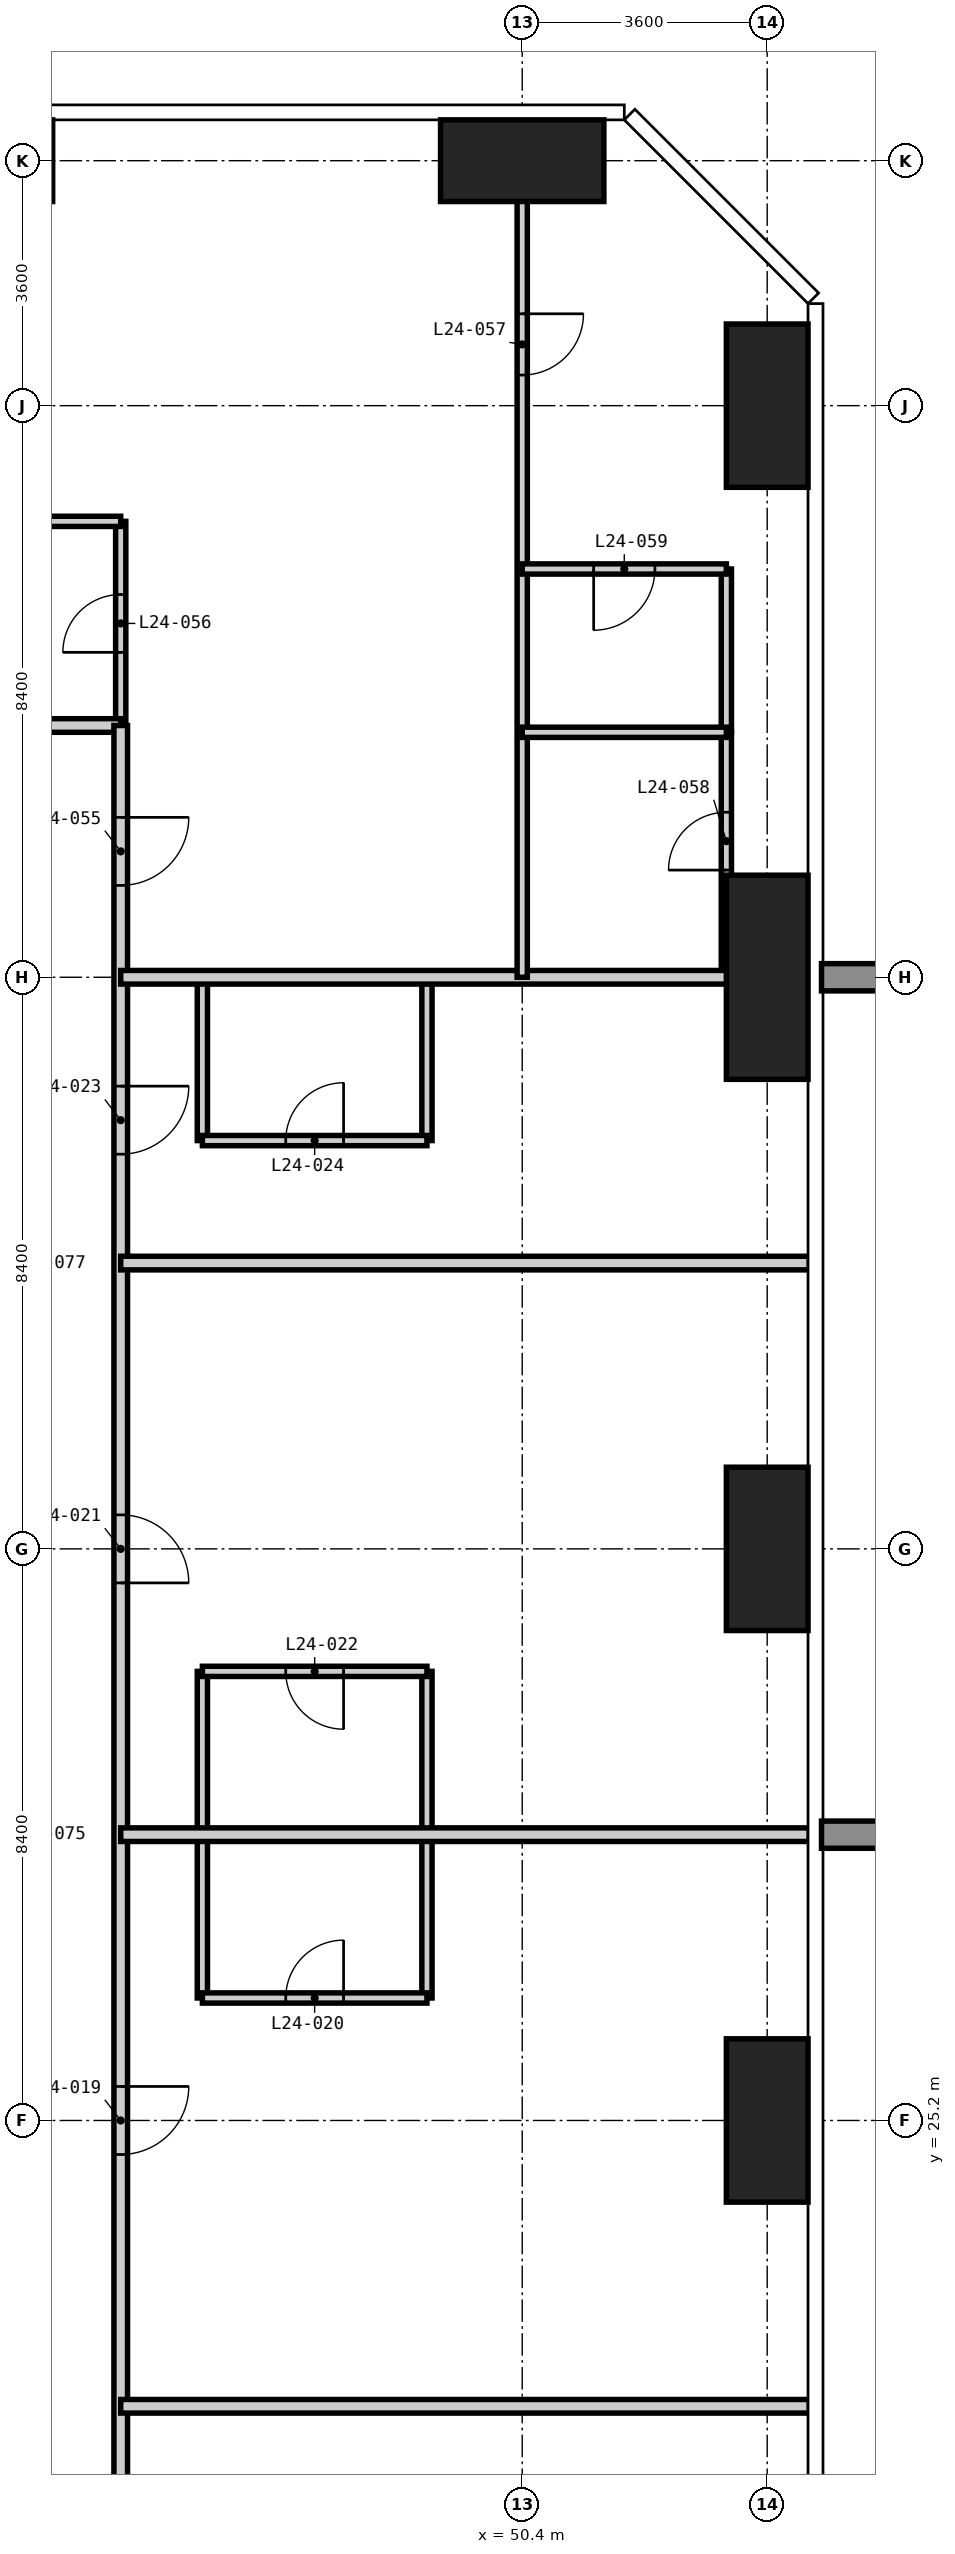
"""IFC4 building model, lengths in metres.
Left out: names, types, materials, properties, quantities, classifications, styles, units other than length and angle.
Written with IfcOpenShell. Run it as: python <this file> out.ifc"""

import sys

from ifc_helpers import new_model, si_unit, direction, frame, frame_2d, origin, origin_2d, place, context, subcontext, project, spatial, rectangle, extrude, element, fill, save


model = new_model("IFC4")
c1 = context("Model", 3, precision=1e-05, world=origin(), true_north=direction((0.0, 1.0)))
c2 = subcontext(c1, "Body", "Model", "MODEL_VIEW")
j1 = project(units=[si_unit("LENGTHUNIT", "METRE"), si_unit("PLANEANGLEUNIT", "RADIAN")], contexts=[c1])
p1 = place(None, origin())
s1 = spatial("IfcSite", under=j1, at=p1, CompositionType="ELEMENT")
p2 = place(p1, origin())
s2 = spatial("IfcBuilding", under=s1, at=p2, CompositionType="ELEMENT")
p3 = place(p2, frame((0.0, 0.0, 97.2)))
s3 = spatial("IfcBuildingStorey", under=s2, at=p3, CompositionType="ELEMENT", Elevation=97.2)
p4 = place(p3, frame((50.4, 54.0, -0.35), z_axis=(0.0, 0.0, 1.0), x_axis=(1.0, 0.0, 0.0)))
e1 = element("IfcColumn", 1, at=p4, inside=s3, PredefinedType="COLUMN", context=c2, shape_type="SweptSolid", body=[
    extrude(rectangle(XDim=2.4, YDim=1.2, at=origin_2d()), origin(), (0.0, 0.0, 1.0), 3.6),
])
for number, where, z_axis, x_axis in (
    (2, (54.0, 25.2, -0.35), (0.0, 0.0, 1.0), (1.0, 0.0, 0.0)),
    (3, (54.0, 33.6, -0.35), (0.0, 0.0, 1.0), (1.0, 0.0, 0.0)),
):
    element("IfcColumn", number, at=place(p3, frame(where, z_axis=z_axis, x_axis=x_axis)), inside=s3, PredefinedType="COLUMN", context=c2, shape_type="SweptSolid", body=[
        extrude(rectangle(XDim=1.2, YDim=2.4, at=origin_2d()), origin(), (0.0, 0.0, 1.0), 3.6),
    ])
p5 = place(p3, frame((54.0, 42.0, -0.35), z_axis=(0.0, 0.0, 1.0), x_axis=(1.0, 0.0, 0.0)))
e4 = element("IfcColumn", 4, at=p5, inside=s3, PredefinedType="COLUMN", context=c2, shape_type="SweptSolid", body=[
    extrude(rectangle(XDim=1.2, YDim=3.0, at=origin_2d()), origin(), (0.0, 0.0, 1.0), 3.6),
])
p6 = place(p3, frame((54.0, 50.4, -0.35), z_axis=(0.0, 0.0, 1.0), x_axis=(1.0, 0.0, 0.0)))
e5 = element("IfcColumn", 5, at=p6, inside=s3, PredefinedType="COLUMN", context=c2, shape_type="SweptSolid", body=[
    extrude(rectangle(XDim=1.2, YDim=2.4, at=origin_2d()), origin(), (0.0, 0.0, 1.0), 3.6),
])
p7 = place(p3, frame((44.5, 45.7, 0.0), z_axis=(0.0, 0.0, 1.0), x_axis=(0.0, 1.0, 0.0)))
e6 = element("IfcWall", 6, at=p7, inside=s3, PredefinedType="PARTITIONING", context=c2, shape_type="SweptSolid", body=[
    extrude(rectangle(XDim=3.0, YDim=0.15, at=frame_2d((1.5, 0.0))), origin(), (0.0, 0.0, 1.0), 3.25),
])
p8 = place(p7, frame((1.075, 0.0, 0.0)))
e7 = element("IfcOpeningElement", 7, at=p8, cuts=e6, PredefinedType="OPENING", context=c2, shape_type="SweptSolid", body=[
    extrude(rectangle(XDim=0.85, YDim=2.1, at=frame_2d((0.425, 1.05))), frame((0.0, 0.085, 0.0), z_axis=(0.0, -1.0, 0.0), x_axis=(1.0, 0.0, 0.0)), (0.0, 0.0, 1.0), 0.17),
])
p9 = place(p3, frame((45.7, 27.0, 0.0), z_axis=(0.0, 0.0, 1.0), x_axis=(0.0, 1.0, 0.0)))
e8 = element("IfcWall", 8, at=p9, inside=s3, PredefinedType="PARTITIONING", context=c2, shape_type="SweptSolid", body=[
    extrude(rectangle(XDim=4.8, YDim=0.15, at=frame_2d((2.4, 0.0))), origin(), (0.0, 0.0, 1.0), 3.25),
])
p10 = place(p3, frame((45.7, 39.6, 0.0), z_axis=(0.0, 0.0, 1.0), x_axis=(0.0, 1.0, 0.0)))
e9 = element("IfcWall", 9, at=p10, inside=s3, PredefinedType="PARTITIONING", context=c2, shape_type="SweptSolid", body=[
    extrude(rectangle(XDim=2.4, YDim=0.15, at=frame_2d((1.2, 0.0))), origin(), (0.0, 0.0, 1.0), 3.25),
])
p11 = place(p3, frame((49.0, 27.0, 0.0), z_axis=(0.0, 0.0, 1.0), x_axis=(0.0, 1.0, 0.0)))
e10 = element("IfcWall", 10, at=p11, inside=s3, PredefinedType="PARTITIONING", context=c2, shape_type="SweptSolid", body=[
    extrude(rectangle(XDim=4.8, YDim=0.15, at=frame_2d((2.4, 0.0))), origin(), (0.0, 0.0, 1.0), 3.25),
])
p12 = place(p3, frame((49.0, 39.6, 0.0), z_axis=(0.0, 0.0, 1.0), x_axis=(0.0, 1.0, 0.0)))
e11 = element("IfcWall", 11, at=p12, inside=s3, PredefinedType="PARTITIONING", context=c2, shape_type="SweptSolid", body=[
    extrude(rectangle(XDim=2.4, YDim=0.15, at=frame_2d((1.2, 0.0))), origin(), (0.0, 0.0, 1.0), 3.25),
])
p13 = place(p3, frame((53.4, 42.0, 0.0), z_axis=(0.0, 0.0, 1.0), x_axis=(0.0, 1.0, 0.0)))
e12 = element("IfcWall", 12, at=p13, inside=s3, PredefinedType="PARTITIONING", context=c2, shape_type="SweptSolid", body=[
    extrude(rectangle(XDim=3.6, YDim=0.15, at=frame_2d((1.8, 0.0))), origin(), (0.0, 0.0, 1.0), 3.25),
])
p14 = place(p13, frame((1.575, 0.0, 0.0)))
e13 = element("IfcOpeningElement", 13, at=p14, cuts=e12, PredefinedType="OPENING", context=c2, shape_type="SweptSolid", body=[
    extrude(rectangle(XDim=0.85, YDim=2.1, at=frame_2d((0.425, 1.05))), frame((0.0, 0.085, 0.0), z_axis=(0.0, -1.0, 0.0), x_axis=(1.0, 0.0, 0.0)), (0.0, 0.0, 1.0), 0.17),
])
p15 = place(p3, frame((45.7, 27.0, 0.0), z_axis=(0.0, 0.0, 1.0), x_axis=(1.0, 0.0, 0.0)))
e14 = element("IfcWall", 14, at=p15, inside=s3, PredefinedType="PARTITIONING", context=c2, shape_type="SweptSolid", body=[
    extrude(rectangle(XDim=3.3, YDim=0.15, at=frame_2d((1.65, 0.0))), origin(), (0.0, 0.0, 1.0), 3.25),
])
p16 = place(p15, frame((1.225, 0.0, 0.0)))
e15 = element("IfcOpeningElement", 15, at=p16, cuts=e14, PredefinedType="OPENING", context=c2, shape_type="SweptSolid", body=[
    extrude(rectangle(XDim=0.85, YDim=2.1, at=frame_2d((0.425, 1.05))), frame((0.0, 0.085, 0.0), z_axis=(0.0, -1.0, 0.0), x_axis=(1.0, 0.0, 0.0)), (0.0, 0.0, 1.0), 0.17),
])
p17 = place(p3, frame((45.7, 31.8, 0.0), z_axis=(0.0, 0.0, 1.0), x_axis=(1.0, 0.0, 0.0)))
e16 = element("IfcWall", 16, at=p17, inside=s3, PredefinedType="PARTITIONING", context=c2, shape_type="SweptSolid", body=[
    extrude(rectangle(XDim=3.3, YDim=0.15, at=frame_2d((1.65, 0.0))), origin(), (0.0, 0.0, 1.0), 3.25),
])
p18 = place(p17, frame((1.225, 0.0, 0.0)))
e17 = element("IfcOpeningElement", 17, at=p18, cuts=e16, PredefinedType="OPENING", context=c2, shape_type="SweptSolid", body=[
    extrude(rectangle(XDim=0.85, YDim=2.1, at=frame_2d((0.425, 1.05))), frame((0.0, 0.085, 0.0), z_axis=(0.0, -1.0, 0.0), x_axis=(1.0, 0.0, 0.0)), (0.0, 0.0, 1.0), 0.17),
])
p19 = place(p3, frame((45.7, 39.6, 0.0), z_axis=(0.0, 0.0, 1.0), x_axis=(1.0, 0.0, 0.0)))
e18 = element("IfcWall", 18, at=p19, inside=s3, PredefinedType="PARTITIONING", context=c2, shape_type="SweptSolid", body=[
    extrude(rectangle(XDim=3.3, YDim=0.15, at=frame_2d((1.65, 0.0))), origin(), (0.0, 0.0, 1.0), 3.25),
])
p20 = place(p19, frame((1.225, 0.0, 0.0)))
e19 = element("IfcOpeningElement", 19, at=p20, cuts=e18, PredefinedType="OPENING", context=c2, shape_type="SweptSolid", body=[
    extrude(rectangle(XDim=0.85, YDim=2.1, at=frame_2d((0.425, 1.05))), frame((0.0, 0.085, 0.0), z_axis=(0.0, -1.0, 0.0), x_axis=(1.0, 0.0, 0.0)), (0.0, 0.0, 1.0), 0.17),
])
p21 = place(p3, frame((42.0, 48.7, 0.0), z_axis=(0.0, 0.0, 1.0), x_axis=(1.0, 0.0, 0.0)))
e20 = element("IfcWall", 20, at=p21, inside=s3, PredefinedType="PARTITIONING", context=c2, shape_type="SweptSolid", body=[
    extrude(rectangle(XDim=2.5, YDim=0.15, at=frame_2d((1.25, 0.0))), origin(), (0.0, 0.0, 1.0), 3.25),
])
p22 = place(p3, frame((12.6, 45.7, 0.0), z_axis=(0.0, 0.0, 1.0), x_axis=(1.0, 0.0, 0.0)))
e21 = element("IfcWall", 21, at=p22, inside=s3, PredefinedType="PARTITIONING", context=c2, shape_type="SweptSolid", body=[
    extrude(rectangle(XDim=31.9, YDim=0.2, at=frame_2d((15.95, 0.0))), origin(), (0.0, 0.0, 1.0), 3.25),
])
p23 = place(p22, frame((5.8, 0.0, 0.0)))
e22 = element("IfcOpeningElement", 22, at=p23, cuts=e21, PredefinedType="OPENING", context=c2, shape_type="SweptSolid", body=[
    extrude(rectangle(XDim=1.0, YDim=2.2, at=frame_2d((0.5, 1.1))), frame((0.0, 0.11, 0.0), z_axis=(0.0, -1.0, 0.0), x_axis=(1.0, 0.0, 0.0)), (0.0, 0.0, 1.0), 0.22),
])
p24 = place(p22, frame((12.1, 0.0, 0.0)))
e23 = element("IfcOpeningElement", 23, at=p24, cuts=e21, PredefinedType="OPENING", context=c2, shape_type="SweptSolid", body=[
    extrude(rectangle(XDim=1.0, YDim=2.2, at=frame_2d((0.5, 1.1))), frame((0.0, 0.11, 0.0), z_axis=(0.0, -1.0, 0.0), x_axis=(1.0, 0.0, 0.0)), (0.0, 0.0, 1.0), 0.22),
])
p25 = place(p22, frame((20.5, 0.0, 0.0)))
e24 = element("IfcOpeningElement", 24, at=p25, cuts=e21, PredefinedType="OPENING", context=c2, shape_type="SweptSolid", body=[
    extrude(rectangle(XDim=1.0, YDim=2.2, at=frame_2d((0.5, 1.1))), frame((0.0, 0.11, 0.0), z_axis=(0.0, -1.0, 0.0), x_axis=(1.0, 0.0, 0.0)), (0.0, 0.0, 1.0), 0.22),
])
p26 = place(p22, frame((26.8, 0.0, 0.0)))
e25 = element("IfcOpeningElement", 25, at=p26, cuts=e21, PredefinedType="OPENING", context=c2, shape_type="SweptSolid", body=[
    extrude(rectangle(XDim=1.0, YDim=2.2, at=frame_2d((0.5, 1.1))), frame((0.0, 0.11, 0.0), z_axis=(0.0, -1.0, 0.0), x_axis=(1.0, 0.0, 0.0)), (0.0, 0.0, 1.0), 0.22),
])
p27 = place(p3, frame((44.5, 45.7, 0.0), z_axis=(0.0, 0.0, 1.0), x_axis=(0.0, -1.0, 0.0)))
e26 = element("IfcWall", 26, at=p27, inside=s3, PredefinedType="PARTITIONING", context=c2, shape_type="SweptSolid", body=[
    extrude(rectangle(XDim=32.0, YDim=0.2, at=frame_2d((16.0, 0.0))), origin(), (0.0, 0.0, 1.0), 3.25),
])
p28 = place(p27, frame((26.3, 0.0, 0.0)))
e27 = element("IfcOpeningElement", 27, at=p28, cuts=e26, PredefinedType="OPENING", context=c2, shape_type="SweptSolid", body=[
    extrude(rectangle(XDim=1.0, YDim=2.2, at=frame_2d((0.5, 1.1))), frame((0.0, 0.11, 0.0), z_axis=(0.0, -1.0, 0.0), x_axis=(1.0, 0.0, 0.0)), (0.0, 0.0, 1.0), 0.22),
])
p29 = place(p27, frame((20.0, 0.0, 0.0)))
e28 = element("IfcOpeningElement", 28, at=p29, cuts=e26, PredefinedType="OPENING", context=c2, shape_type="SweptSolid", body=[
    extrude(rectangle(XDim=1.0, YDim=2.2, at=frame_2d((0.5, 1.1))), frame((0.0, 0.11, 0.0), z_axis=(0.0, -1.0, 0.0), x_axis=(1.0, 0.0, 0.0)), (0.0, 0.0, 1.0), 0.22),
])
p30 = place(p27, frame((11.6, 0.0, 0.0)))
e29 = element("IfcOpeningElement", 29, at=p30, cuts=e26, PredefinedType="OPENING", context=c2, shape_type="SweptSolid", body=[
    extrude(rectangle(XDim=1.0, YDim=2.2, at=frame_2d((0.5, 1.1))), frame((0.0, 0.11, 0.0), z_axis=(0.0, -1.0, 0.0), x_axis=(1.0, 0.0, 0.0)), (0.0, 0.0, 1.0), 0.22),
])
p31 = place(p27, frame((5.3, 0.0, 0.0)))
e30 = element("IfcOpeningElement", 30, at=p31, cuts=e26, PredefinedType="OPENING", context=c2, shape_type="SweptSolid", body=[
    extrude(rectangle(XDim=1.0, YDim=2.2, at=frame_2d((0.5, 1.1))), frame((0.0, 0.11, 0.0), z_axis=(0.0, -1.0, 0.0), x_axis=(1.0, 0.0, 0.0)), (0.0, 0.0, 1.0), 0.22),
])
p32 = place(p27, frame((29.95, 0.0, 0.0)))
e31 = element("IfcOpeningElement", 31, at=p32, cuts=e26, PredefinedType="OPENING", context=c2, shape_type="SweptSolid", body=[
    extrude(rectangle(XDim=1.0, YDim=2.2, at=frame_2d((0.5, 1.1))), frame((0.0, 0.11, 0.0), z_axis=(0.0, -1.0, 0.0), x_axis=(1.0, 0.0, 0.0)), (0.0, 0.0, 1.0), 0.22),
])
p33 = place(p27, frame((1.35, 0.0, 0.0)))
e32 = element("IfcOpeningElement", 32, at=p33, cuts=e26, PredefinedType="OPENING", context=c2, shape_type="SweptSolid", body=[
    extrude(rectangle(XDim=1.0, YDim=2.2, at=frame_2d((0.5, 1.1))), frame((0.0, 0.11, 0.0), z_axis=(0.0, -1.0, 0.0), x_axis=(1.0, 0.0, 0.0)), (0.0, 0.0, 1.0), 0.22),
])
for number, where, z_axis, x_axis in (
    (33, (44.5, 21.0, 0.0), (0.0, 0.0, 1.0), (1.0, 0.0, 0.0)),
    (34, (44.5, 29.4, 0.0), (0.0, 0.0, 1.0), (1.0, 0.0, 0.0)),
    (35, (44.5, 37.8, 0.0), (0.0, 0.0, 1.0), (1.0, 0.0, 0.0)),
    (36, (44.5, 42.0, 0.0), (0.0, 0.0, 1.0), (1.0, 0.0, 0.0)),
):
    element("IfcWall", number, at=place(p3, frame(where, z_axis=z_axis, x_axis=x_axis)), inside=s3, PredefinedType="PARTITIONING", context=c2, shape_type="SweptSolid", body=[
        extrude(rectangle(XDim=10.118, YDim=0.2, at=frame_2d((5.059, 0.0))), origin(), (0.0, 0.0, 1.0), 3.25),
    ])
p34 = place(p3, frame((50.4, 42.0, 0.0), z_axis=(0.0, 0.0, 1.0), x_axis=(0.0, 1.0, 0.0)))
e37 = element("IfcWall", 37, at=p34, inside=s3, PredefinedType="PARTITIONING", context=c2, shape_type="SweptSolid", body=[
    extrude(rectangle(XDim=12.618, YDim=0.15, at=frame_2d((6.309, 0.0))), origin(), (0.0, 0.0, 1.0), 3.25),
])
p35 = place(p34, frame((8.85, 0.0, 0.0)))
e38 = element("IfcOpeningElement", 38, at=p35, cuts=e37, PredefinedType="OPENING", context=c2, shape_type="SweptSolid", body=[
    extrude(rectangle(XDim=0.9, YDim=2.1, at=frame_2d((0.45, 1.05))), frame((0.0, 0.085, 0.0), z_axis=(0.0, -1.0, 0.0), x_axis=(1.0, 0.0, 0.0)), (0.0, 0.0, 1.0), 0.17),
])
p36 = place(p3, frame((53.4, 45.6, 0.0), z_axis=(0.0, 0.0, 1.0), x_axis=(0.0, 1.0, 0.0)))
e39 = element("IfcWall", 39, at=p36, inside=s3, PredefinedType="PARTITIONING", context=c2, shape_type="SweptSolid", body=[
    extrude(rectangle(XDim=2.4, YDim=0.15, at=frame_2d((1.2, 0.0))), origin(), (0.0, 0.0, 1.0), 3.25),
])
p37 = place(p3, frame((50.4, 45.6, 0.0), z_axis=(0.0, 0.0, 1.0), x_axis=(1.0, 0.0, 0.0)))
e40 = element("IfcWall", 40, at=p37, inside=s3, PredefinedType="PARTITIONING", context=c2, shape_type="SweptSolid", body=[
    extrude(rectangle(XDim=3.0, YDim=0.15, at=frame_2d((1.5, 0.0))), origin(), (0.0, 0.0, 1.0), 3.25),
])
p38 = place(p3, frame((50.4, 48.0, 0.0), z_axis=(0.0, 0.0, 1.0), x_axis=(1.0, 0.0, 0.0)))
e41 = element("IfcWall", 41, at=p38, inside=s3, PredefinedType="PARTITIONING", context=c2, shape_type="SweptSolid", body=[
    extrude(rectangle(XDim=3.0, YDim=0.15, at=frame_2d((1.5, 0.0))), origin(), (0.0, 0.0, 1.0), 3.25),
])
p39 = place(p38, frame((1.05, 0.0, 0.0)))
e42 = element("IfcOpeningElement", 42, at=p39, cuts=e41, PredefinedType="OPENING", context=c2, shape_type="SweptSolid", body=[
    extrude(rectangle(XDim=0.9, YDim=2.1, at=frame_2d((0.45, 1.05))), frame((0.0, 0.085, 0.0), z_axis=(0.0, -1.0, 0.0), x_axis=(1.0, 0.0, 0.0)), (0.0, 0.0, 1.0), 0.17),
])
p40 = place(p29, origin())
e43 = element("IfcDoor", 43, at=p40, inside=s3, OperationType="SINGLE_SWING_LEFT", PredefinedType="DOOR", context=c2, shape_type="SweptSolid", body=[
    extrude(rectangle(XDim=1.0, YDim=2.2, at=frame_2d((0.5, 1.1))), frame((0.0, 0.025, 0.0), z_axis=(0.0, -1.0, 0.0), x_axis=(1.0, 0.0, 0.0)), (0.0, 0.0, 1.0), 0.05),
])
fill(e28, e43)
p41 = place(p16, origin())
e44 = element("IfcDoor", 44, at=p41, inside=s3, OperationType="SINGLE_SWING_RIGHT", PredefinedType="DOOR", context=c2, shape_type="SweptSolid", body=[
    extrude(rectangle(XDim=0.85, YDim=2.1, at=frame_2d((0.425, 1.05))), frame((0.0, 0.025, 0.0), z_axis=(0.0, -1.0, 0.0), x_axis=(1.0, 0.0, 0.0)), (0.0, 0.0, 1.0), 0.05),
])
fill(e15, e44)
p42 = place(p30, origin())
e45 = element("IfcDoor", 45, at=p42, inside=s3, OperationType="SINGLE_SWING_RIGHT", PredefinedType="DOOR", context=c2, shape_type="SweptSolid", body=[
    extrude(rectangle(XDim=1.0, YDim=2.2, at=frame_2d((0.5, 1.1))), frame((0.0, 0.025, 0.0), z_axis=(0.0, -1.0, 0.0), x_axis=(1.0, 0.0, 0.0)), (0.0, 0.0, 1.0), 0.05),
])
fill(e29, e45)
p43 = place(p18, frame((0.85, 0.0, 0.0), z_axis=(0.0, 0.0, 1.0), x_axis=(-1.0, 0.0, 0.0)))
e46 = element("IfcDoor", 46, at=p43, inside=s3, OperationType="SINGLE_SWING_LEFT", PredefinedType="DOOR", context=c2, shape_type="SweptSolid", body=[
    extrude(rectangle(XDim=0.85, YDim=2.1, at=frame_2d((0.425, 1.05))), frame((0.0, 0.025, 0.0), z_axis=(0.0, -1.0, 0.0), x_axis=(1.0, 0.0, 0.0)), (0.0, 0.0, 1.0), 0.05),
])
fill(e17, e46)
p44 = place(p31, origin())
e47 = element("IfcDoor", 47, at=p44, inside=s3, OperationType="SINGLE_SWING_LEFT", PredefinedType="DOOR", context=c2, shape_type="SweptSolid", body=[
    extrude(rectangle(XDim=1.0, YDim=2.2, at=frame_2d((0.5, 1.1))), frame((0.0, 0.025, 0.0), z_axis=(0.0, -1.0, 0.0), x_axis=(1.0, 0.0, 0.0)), (0.0, 0.0, 1.0), 0.05),
])
fill(e30, e47)
p45 = place(p20, origin())
e48 = element("IfcDoor", 48, at=p45, inside=s3, OperationType="SINGLE_SWING_RIGHT", PredefinedType="DOOR", context=c2, shape_type="SweptSolid", body=[
    extrude(rectangle(XDim=0.85, YDim=2.1, at=frame_2d((0.425, 1.05))), frame((0.0, 0.025, 0.0), z_axis=(0.0, -1.0, 0.0), x_axis=(1.0, 0.0, 0.0)), (0.0, 0.0, 1.0), 0.05),
])
fill(e19, e48)
p46 = place(p33, origin())
e49 = element("IfcDoor", 49, at=p46, inside=s3, OperationType="SINGLE_SWING_LEFT", PredefinedType="DOOR", context=c2, shape_type="SweptSolid", body=[
    extrude(rectangle(XDim=1.0, YDim=2.2, at=frame_2d((0.5, 1.1))), frame((0.0, 0.025, 0.0), z_axis=(0.0, -1.0, 0.0), x_axis=(1.0, 0.0, 0.0)), (0.0, 0.0, 1.0), 0.05),
])
fill(e32, e49)
p47 = place(p8, origin())
e50 = element("IfcDoor", 50, at=p47, inside=s3, OperationType="SINGLE_SWING_LEFT", PredefinedType="DOOR", context=c2, shape_type="SweptSolid", body=[
    extrude(rectangle(XDim=0.85, YDim=2.1, at=frame_2d((0.425, 1.05))), frame((0.0, 0.025, 0.0), z_axis=(0.0, -1.0, 0.0), x_axis=(1.0, 0.0, 0.0)), (0.0, 0.0, 1.0), 0.05),
])
fill(e7, e50)
p48 = place(p35, frame((0.9, 0.0, 0.0), z_axis=(0.0, 0.0, 1.0), x_axis=(-1.0, 0.0, 0.0)))
e51 = element("IfcDoor", 51, at=p48, inside=s3, OperationType="SINGLE_SWING_LEFT", PredefinedType="DOOR", context=c2, shape_type="SweptSolid", body=[
    extrude(rectangle(XDim=0.9, YDim=2.1, at=frame_2d((0.45, 1.05))), frame((0.0, 0.025, 0.0), z_axis=(0.0, -1.0, 0.0), x_axis=(1.0, 0.0, 0.0)), (0.0, 0.0, 1.0), 0.05),
])
fill(e38, e51)
p49 = place(p14, origin())
e52 = element("IfcDoor", 52, at=p49, inside=s3, OperationType="SINGLE_SWING_LEFT", PredefinedType="DOOR", context=c2, shape_type="SweptSolid", body=[
    extrude(rectangle(XDim=0.85, YDim=2.1, at=frame_2d((0.425, 1.05))), frame((0.0, 0.025, 0.0), z_axis=(0.0, -1.0, 0.0), x_axis=(1.0, 0.0, 0.0)), (0.0, 0.0, 1.0), 0.05),
])
fill(e13, e52)
p50 = place(p39, frame((0.9, 0.0, 0.0), z_axis=(0.0, 0.0, 1.0), x_axis=(-1.0, 0.0, 0.0)))
e53 = element("IfcDoor", 53, at=p50, inside=s3, OperationType="SINGLE_SWING_RIGHT", PredefinedType="DOOR", context=c2, shape_type="SweptSolid", body=[
    extrude(rectangle(XDim=0.9, YDim=2.1, at=frame_2d((0.45, 1.05))), frame((0.0, 0.025, 0.0), z_axis=(0.0, -1.0, 0.0), x_axis=(1.0, 0.0, 0.0)), (0.0, 0.0, 1.0), 0.05),
])
fill(e42, e53)
save(model, sys.argv[1])
